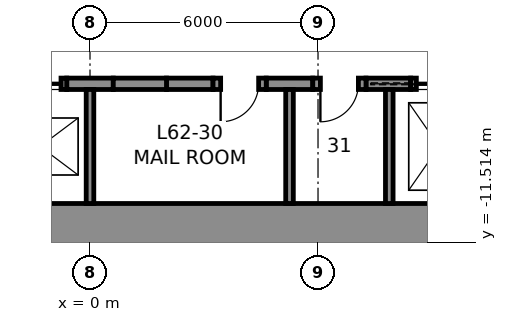
"""IFC4 building model, lengths in metres.
Left out: names, types, materials, properties, quantities, classifications, styles, units other than length and angle.
Written with IfcOpenShell. Run it as: python <this file> out.ifc"""

import sys

from ifc_helpers import new_model, si_unit, direction, frame, frame_2d, origin, place, context, subcontext, project, spatial, rectangle, extrude, element, fill, save


model = new_model("IFC4")
c1 = context("Model", 3, precision=1e-05, world=origin(), true_north=direction((0.0, 1.0)))
c2 = subcontext(c1, "Body", "Model", "MODEL_VIEW")
j1 = project(units=[si_unit("LENGTHUNIT", "METRE"), si_unit("PLANEANGLEUNIT", "RADIAN")], contexts=[c1])
p1 = place(None, origin())
s1 = spatial("IfcSite", under=j1, at=p1, CompositionType="ELEMENT")
p2 = place(p1, origin())
s2 = spatial("IfcBuilding", under=s1, at=p2, CompositionType="ELEMENT")
p3 = place(p2, frame((0.0, 0.0, 277.8)))
s3 = spatial("IfcBuildingStorey", under=s2, at=p3, CompositionType="ELEMENT", Elevation=277.8)
p4 = place(p3, frame((12.0, -11.25, 0.0), z_axis=(0.0, 0.0, 1.0), x_axis=(-1.0, 0.0, 0.0)))
e1 = element("IfcWall", 1, at=p4, inside=s3, PredefinedType="SHEAR", context=c2, shape_type="SweptSolid", body=[
    extrude(rectangle(XDim=24.0, YDim=1.5, at=frame_2d((12.0, 0.0))), origin(), (0.0, 0.0, 1.0), 4.0),
])
for number, where, z_axis, x_axis in (
    (2, (-0.613, -7.35, 0.0), (0.0, 0.0, 1.0), (1.0, 0.0, 0.0)),
    (3, (2.012, -7.35, 0.0), (0.0, 0.0, 1.0), (1.0, 0.0, 0.0)),
    (4, (4.637, -7.35, 0.0), (0.0, 0.0, 1.0), (1.0, 0.0, 0.0)),
):
    element("IfcWall", number, at=place(p3, frame(where, z_axis=z_axis, x_axis=x_axis)), inside=s3, PredefinedType="SHEAR", context=c2, shape_type="SweptSolid", body=[
        extrude(rectangle(XDim=1.225, YDim=0.3, at=frame_2d((0.613, 0.0))), origin(), (0.0, 0.0, 1.0), 4.0),
    ])
p5 = place(p3, frame((7.262, -7.35, 0.0), z_axis=(0.0, 0.0, 1.0), x_axis=(1.0, 0.0, 0.0)))
e5 = element("IfcWall", 5, at=p5, inside=s3, PredefinedType="SHEAR", context=c2, shape_type="SweptSolid", body=[
    extrude(rectangle(XDim=1.175, YDim=0.3, at=frame_2d((0.587, 0.0))), origin(), (0.0, 0.0, 1.0), 4.0),
])
p6 = place(p3, frame((-2.012, -7.35, 0.0), z_axis=(0.0, 0.0, 1.0), x_axis=(1.0, 0.0, 0.0)))
e6 = element("IfcWall", 6, at=p6, inside=s3, PredefinedType="PARTITIONING", context=c2, shape_type="SweptSolid", body=[
    extrude(rectangle(XDim=1.4, YDim=0.3, at=frame_2d((0.7, 0.0))), origin(), (0.0, 0.0, 1.0), 4.0),
])
p7 = place(p6, frame((0.15, 0.0, 0.0)))
e7 = element("IfcOpeningElement", 7, at=p7, cuts=e6, PredefinedType="OPENING", context=c2, shape_type="SweptSolid", body=[
    extrude(rectangle(XDim=1.1, YDim=2.3, at=frame_2d((0.55, 1.15))), frame((0.0, 0.16, 0.0), z_axis=(0.0, -1.0, 0.0), x_axis=(1.0, 0.0, 0.0)), (0.0, 0.0, 1.0), 0.32),
])
p8 = place(p3, frame((0.613, -7.35, 0.0), z_axis=(0.0, 0.0, 1.0), x_axis=(1.0, 0.0, 0.0)))
e8 = element("IfcWall", 8, at=p8, inside=s3, PredefinedType="PARTITIONING", context=c2, shape_type="SweptSolid", body=[
    extrude(rectangle(XDim=1.4, YDim=0.3, at=frame_2d((0.7, 0.0))), origin(), (0.0, 0.0, 1.0), 4.0),
])
p9 = place(p3, frame((3.238, -7.35, 0.0), z_axis=(0.0, 0.0, 1.0), x_axis=(1.0, 0.0, 0.0)))
e9 = element("IfcWall", 9, at=p9, inside=s3, PredefinedType="PARTITIONING", context=c2, shape_type="SweptSolid", body=[
    extrude(rectangle(XDim=1.4, YDim=0.3, at=frame_2d((0.7, 0.0))), origin(), (0.0, 0.0, 1.0), 4.0),
])
p10 = place(p9, frame((0.2, 0.0, 0.0)))
e10 = element("IfcOpeningElement", 10, at=p10, cuts=e9, PredefinedType="OPENING", context=c2, shape_type="SweptSolid", body=[
    extrude(rectangle(XDim=1.0, YDim=2.3, at=frame_2d((0.5, 1.15))), frame((0.0, 0.16, 0.0), z_axis=(0.0, -1.0, 0.0), x_axis=(1.0, 0.0, 0.0)), (0.0, 0.0, 1.0), 0.32),
])
p11 = place(p3, frame((5.863, -7.35, 0.0), z_axis=(0.0, 0.0, 1.0), x_axis=(1.0, 0.0, 0.0)))
e11 = element("IfcWall", 11, at=p11, inside=s3, PredefinedType="PARTITIONING", context=c2, shape_type="SweptSolid", body=[
    extrude(rectangle(XDim=1.4, YDim=0.3, at=frame_2d((0.7, 0.0))), origin(), (0.0, 0.0, 1.0), 4.0),
])
p12 = place(p11, frame((0.2, 0.0, 0.0)))
e12 = element("IfcOpeningElement", 12, at=p12, cuts=e11, PredefinedType="OPENING", context=c2, shape_type="SweptSolid", body=[
    extrude(rectangle(XDim=1.0, YDim=2.3, at=frame_2d((0.5, 1.15))), frame((0.0, 0.16, 0.0), z_axis=(0.0, -1.0, 0.0), x_axis=(1.0, 0.0, 0.0)), (0.0, 0.0, 1.0), 0.32),
])
p13 = place(p3, frame((8.438, -7.35, 0.0), z_axis=(0.0, 0.0, 1.0), x_axis=(1.0, 0.0, 0.0)))
e13 = element("IfcWall", 13, at=p13, inside=s3, PredefinedType="PARTITIONING", context=c2, shape_type="SweptSolid", body=[
    extrude(rectangle(XDim=1.5, YDim=0.3, at=frame_2d((0.75, 0.0))), origin(), (0.0, 0.0, 1.0), 4.0),
])
p14 = place(p13, frame((0.15, 0.0, 0.0)))
e14 = element("IfcOpeningElement", 14, at=p14, cuts=e13, PredefinedType="OPENING", context=c2, shape_type="SweptSolid", body=[
    extrude(rectangle(XDim=1.2, YDim=2.3, at=frame_2d((0.6, 1.15))), frame((0.0, 0.16, 0.0), z_axis=(0.0, -1.0, 0.0), x_axis=(1.0, 0.0, 0.0)), (0.0, 0.0, 1.0), 0.32),
])
for number, where, z_axis, x_axis in (
    (15, (0.0, -10.5, 0.0), (0.0, 0.0, 1.0), (0.0, 1.0, 0.0)),
    (16, (5.25, -10.5, 0.0), (0.0, 0.0, 1.0), (0.0, 1.0, 0.0)),
    (17, (7.875, -10.5, 0.0), (0.0, 0.0, 1.0), (0.0, 1.0, 0.0)),
):
    element("IfcWall", number, at=place(p3, frame(where, z_axis=z_axis, x_axis=x_axis)), inside=s3, PredefinedType="PARTITIONING", context=c2, shape_type="SweptSolid", body=[
        extrude(rectangle(XDim=3.0, YDim=0.2, at=frame_2d((1.5, 0.0))), origin(), (0.0, 0.0, 1.0), 4.0),
    ])
p15 = place(p10, frame((1.0, 0.0, 0.0), z_axis=(0.0, 0.0, 1.0), x_axis=(-1.0, 0.0, 0.0)))
e18 = element("IfcDoor", 18, at=p15, inside=s3, OperationType="SINGLE_SWING_RIGHT", PredefinedType="DOOR", context=c2, shape_type="SweptSolid", body=[
    extrude(rectangle(XDim=1.0, YDim=2.3, at=frame_2d((0.5, 1.15))), frame((0.0, 0.025, 0.0), z_axis=(0.0, -1.0, 0.0), x_axis=(1.0, 0.0, 0.0)), (0.0, 0.0, 1.0), 0.05),
])
fill(e10, e18)
p16 = place(p12, frame((1.0, 0.0, 0.0), z_axis=(0.0, 0.0, 1.0), x_axis=(-1.0, 0.0, 0.0)))
e19 = element("IfcDoor", 19, at=p16, inside=s3, OperationType="SINGLE_SWING_RIGHT", PredefinedType="DOOR", context=c2, shape_type="SweptSolid", body=[
    extrude(rectangle(XDim=1.0, YDim=2.3, at=frame_2d((0.5, 1.15))), frame((0.0, 0.025, 0.0), z_axis=(0.0, -1.0, 0.0), x_axis=(1.0, 0.0, 0.0)), (0.0, 0.0, 1.0), 0.05),
])
fill(e12, e19)
p17 = place(p14, origin())
e20 = element("IfcDoor", 20, at=p17, inside=s3, OperationType="SLIDING_TO_LEFT", PredefinedType="DOOR", context=c2, shape_type="SweptSolid", body=[
    extrude(rectangle(XDim=1.2, YDim=2.3, at=frame_2d((0.6, 1.15))), frame((0.0, 0.025, 0.0), z_axis=(0.0, -1.0, 0.0), x_axis=(1.0, 0.0, 0.0)), (0.0, 0.0, 1.0), 0.05),
])
fill(e14, e20)
p18 = place(p7, origin())
e21 = element("IfcDoor", 21, at=p18, inside=s3, OperationType="SLIDING_TO_LEFT", PredefinedType="DOOR", context=c2, shape_type="SweptSolid", body=[
    extrude(rectangle(XDim=1.1, YDim=2.3, at=frame_2d((0.55, 1.15))), frame((0.0, 0.025, 0.0), z_axis=(0.0, -1.0, 0.0), x_axis=(1.0, 0.0, 0.0)), (0.0, 0.0, 1.0), 0.05),
])
fill(e7, e21)
save(model, sys.argv[1])
